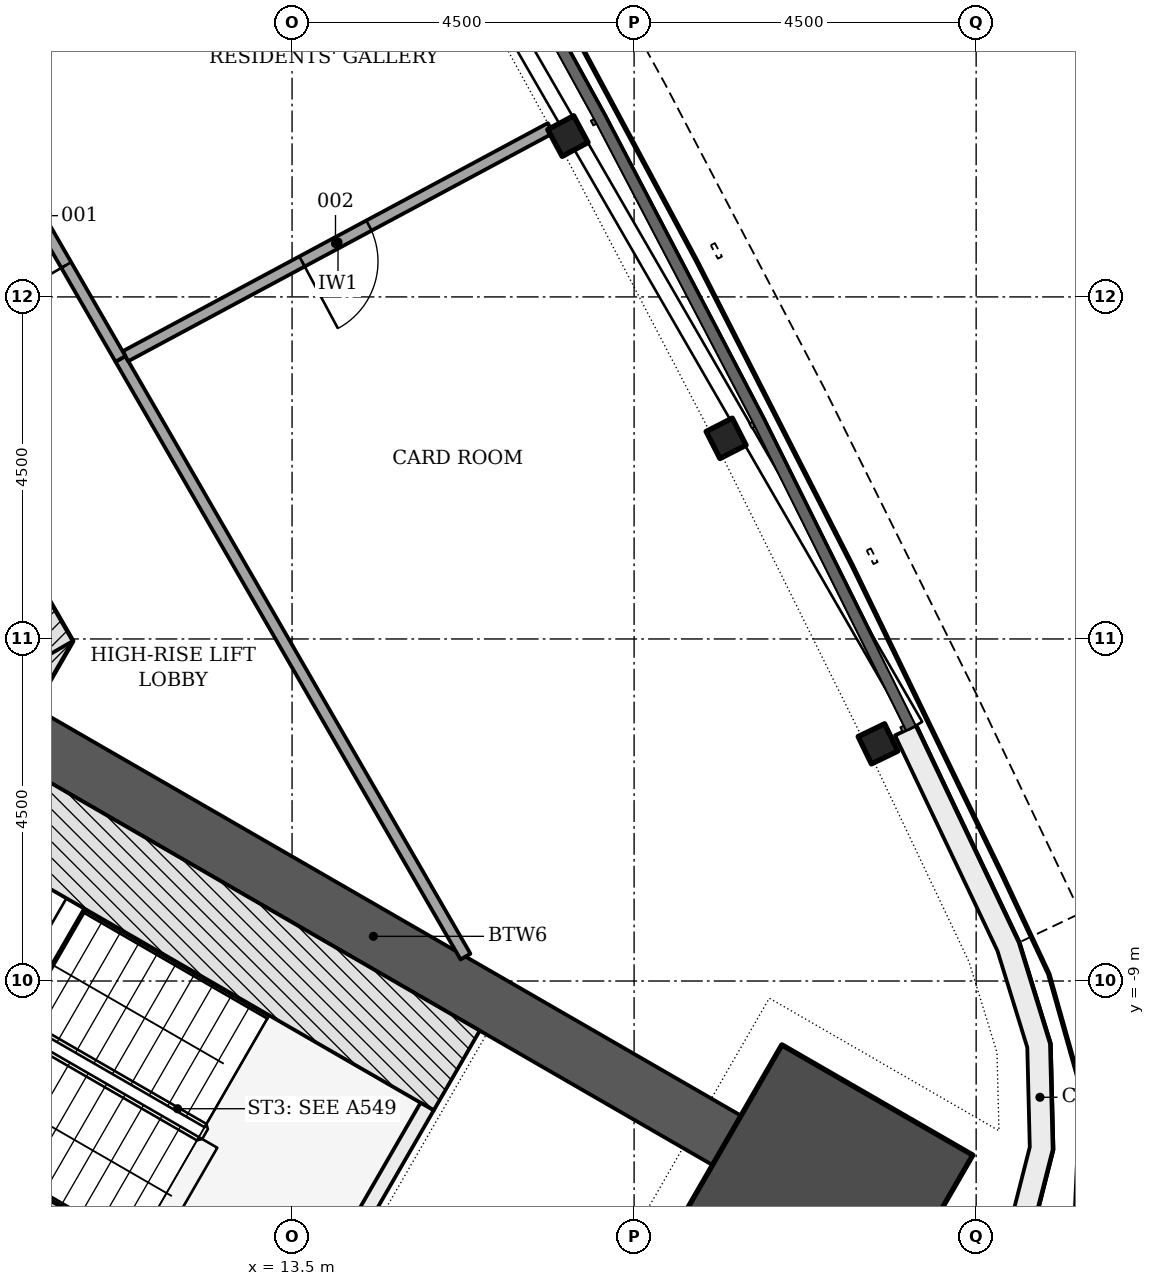
"""IFC4 building model, lengths in metres.
Left out: names, types, materials, properties, quantities, classifications, styles, units other than length and angle.
Written with IfcOpenShell. Run it as: python <this file> out.ifc"""

import sys

from ifc_helpers import new_model, si_unit, direction, frame, frame_2d, origin, origin_2d, place, context, subcontext, project, spatial, polyline, rectangle, i_section, outline, extrude, element, fill, save


model = new_model("IFC4")
c1 = context("Model", 3, precision=1e-05, world=origin(), true_north=direction((0.0, 1.0)))
c2 = subcontext(c1, "Body", "Model", "MODEL_VIEW")
j1 = project(units=[si_unit("LENGTHUNIT", "METRE"), si_unit("PLANEANGLEUNIT", "RADIAN")], contexts=[c1])
p1 = place(None, origin())
s1 = spatial("IfcSite", under=j1, at=p1, CompositionType="ELEMENT")
p2 = place(p1, origin())
s2 = spatial("IfcBuilding", under=s1, at=p2, CompositionType="ELEMENT")
p3 = place(p2, frame((0.0, 0.0, 150.9)))
s3 = spatial("IfcBuildingStorey", under=s2, at=p3, CompositionType="ELEMENT", Elevation=150.9)
p4 = place(p3, frame((8.926, -6.753, -0.2), z_axis=(0.0, 0.0, 1.0), x_axis=(0.500042739161, 0.866000726912, 0.0)))
e1 = element("IfcWall", 1, at=p4, inside=s3, PredefinedType="SHEAR", context=c2, shape_type="SweptSolid", body=[
    extrude(rectangle(XDim=2.771, YDim=0.7, at=frame_2d((1.386, 0.0))), origin(), (0.0, 0.0, 1.0), 3.6),
])
p5 = place(p3, frame((10.311, -4.703, -0.2), z_axis=(0.0, 0.0, 1.0), x_axis=(-0.500001446645, 0.866024568562, 0.0)))
e2 = element("IfcWall", 2, at=p5, inside=s3, PredefinedType="SHEAR", context=c2, shape_type="SweptSolid", body=[
    extrude(rectangle(XDim=18.458, YDim=0.7, at=frame_2d((9.229, 0.0))), origin(), (0.0, 0.0, 1.0), 3.6),
])
p6 = place(p5, frame((4.379, 0.0, 0.2)))
e3 = element("IfcOpeningElement", 3, at=p6, cuts=e2, PredefinedType="OPENING", context=c2, shape_type="SweptSolid", body=[
    extrude(rectangle(XDim=1.1, YDim=2.1, at=frame_2d((0.55, 1.05))), frame((0.0, 0.36, 0.0), z_axis=(0.0, -1.0, 0.0), x_axis=(1.0, 0.0, 0.0)), (0.0, 0.0, 1.0), 0.72),
])
p7 = place(p5, frame((6.529, 0.0, 0.2)))
e4 = element("IfcOpeningElement", 4, at=p7, cuts=e2, PredefinedType="OPENING", context=c2, shape_type="SweptSolid", body=[
    extrude(rectangle(XDim=1.1, YDim=2.1, at=frame_2d((0.55, 1.05))), frame((0.0, 0.36, 0.0), z_axis=(0.0, -1.0, 0.0), x_axis=(1.0, 0.0, 0.0)), (0.0, 0.0, 1.0), 0.72),
])
p8 = place(p5, frame((8.679, 0.0, 0.2)))
e5 = element("IfcOpeningElement", 5, at=p8, cuts=e2, PredefinedType="OPENING", context=c2, shape_type="SweptSolid", body=[
    extrude(rectangle(XDim=1.1, YDim=2.1, at=frame_2d((0.55, 1.05))), frame((0.0, 0.36, 0.0), z_axis=(0.0, -1.0, 0.0), x_axis=(1.0, 0.0, 0.0)), (0.0, 0.0, 1.0), 0.72),
])
p9 = place(p5, frame((10.829, 0.0, 0.2)))
e6 = element("IfcOpeningElement", 6, at=p9, cuts=e2, PredefinedType="OPENING", context=c2, shape_type="SweptSolid", body=[
    extrude(rectangle(XDim=1.1, YDim=2.1, at=frame_2d((0.55, 1.05))), frame((0.0, 0.36, 0.0), z_axis=(0.0, -1.0, 0.0), x_axis=(1.0, 0.0, 0.0)), (0.0, 0.0, 1.0), 0.72),
])
p10 = place(p5, frame((12.979, 0.0, 0.2)))
e7 = element("IfcOpeningElement", 7, at=p10, cuts=e2, PredefinedType="OPENING", context=c2, shape_type="SweptSolid", body=[
    extrude(rectangle(XDim=1.1, YDim=2.1, at=frame_2d((0.55, 1.05))), frame((0.0, 0.36, 0.0), z_axis=(0.0, -1.0, 0.0), x_axis=(1.0, 0.0, 0.0)), (0.0, 0.0, 1.0), 0.72),
])
p11 = place(p3, frame((9.922, -5.728, -0.2), z_axis=(0.0, 0.0, 1.0), x_axis=(0.86602614826, -0.499998710529, 0.0)))
e8 = element("IfcWall", 8, at=p11, inside=s3, PredefinedType="SHEAR", context=c2, shape_type="SweptSolid", body=[
    extrude(rectangle(XDim=10.735, YDim=0.75, at=frame_2d((5.368, 0.0))), origin(), (0.0, 0.0, 1.0), 3.6),
])
p12 = place(p3, frame((20.475, -11.821, -0.2), z_axis=(0.0, 0.0, 1.0), x_axis=(0.866025403784, -0.5, 0.0)))
e9 = element("IfcColumn", 9, at=p12, inside=s3, PredefinedType="COLUMN", context=c2, shape_type="SweptSolid", body=[
    extrude(rectangle(XDim=2.9, YDim=2.9, at=origin_2d()), origin(), (0.0, 0.0, 1.0), 3.6),
])
for number, where, z_axis, x_axis in (
    (10, (21.209, -5.88, -0.2), (0.0, 0.0, 1.0), (-0.436, 0.9, 0.0)),
    (11, (19.21, -1.861, -0.2), (0.0, 0.0, 1.0), (-0.454, 0.891, 0.0)),
    (12, (17.129, 2.116, -0.2), (0.0, 0.0, 1.0), (-0.473, 0.881, 0.0)),
):
    element("IfcColumn", number, at=place(p3, frame(where, z_axis=z_axis, x_axis=x_axis)), inside=s3, PredefinedType="COLUMN", context=c2, shape_type="SweptSolid", body=[
        extrude(i_section(OverallWidth=0.399, OverallDepth=0.386, WebThickness=0.021, FlangeThickness=0.033, FilletRadius=0.015, at=origin_2d()), origin(), (0.0, 0.0, 1.0), 3.6),
    ])
p13 = place(p3, origin())
e13 = element("IfcWall", 13, at=p13, inside=s3, PredefinedType="NOTDEFINED", context=c2, shape_type="SweptSolid", body=[
    extrude(outline(polyline([(15.736, -15.976), (18.887, -15.724), (20.245, -15.414), (21.469, -14.748), (22.466, -13.775), (23.163, -12.569), (23.507, -11.219), (23.472, -9.826), (23.061, -8.494), (21.704, -5.64), (21.433, -5.769), (22.781, -8.604), (23.173, -9.875), (23.206, -11.185), (22.882, -12.455), (22.227, -13.589), (21.289, -14.504), (20.138, -15.131), (18.841, -15.427), (15.712, -15.677), (15.736, -15.976)])), origin(), (0.0, 0.0, 1.0), 3.3),
])
p14 = place(p3, frame((7.304, -10.262, -0.2), z_axis=(0.0, 0.0, 1.0), x_axis=(0.866026594901, -0.49999793692, 0.0)))
e14 = element("IfcWall", 14, at=p14, inside=s3, PredefinedType="SHEAR", context=c2, shape_type="SweptSolid", body=[
    extrude(rectangle(XDim=5.6, YDim=0.2, at=frame_2d((2.8, 0.0))), origin(), (0.0, 0.0, 1.0), 3.6),
])
p15 = place(p14, frame((0.45, 0.0, 0.2)))
e15 = element("IfcOpeningElement", 15, at=p15, cuts=e14, PredefinedType="OPENING", context=c2, shape_type="SweptSolid", body=[
    extrude(rectangle(XDim=1.2, YDim=2.1, at=frame_2d((0.6, 1.05))), frame((0.0, 0.11, 0.0), z_axis=(0.0, -1.0, 0.0), x_axis=(1.0, 0.0, 0.0)), (0.0, 0.0, 1.0), 0.22),
])
p16 = place(p3, frame((9.431, -6.577, -0.2), z_axis=(0.0, 0.0, 1.0), x_axis=(0.866018442252, -0.500012057535, 0.0)))
e16 = element("IfcWall", 16, at=p16, inside=s3, PredefinedType="SHEAR", context=c2, shape_type="SweptSolid", body=[
    extrude(rectangle(XDim=7.2, YDim=1.211, at=frame_2d((3.6, 0.0))), origin(), (0.0, 0.0, 1.0), 3.6),
])
p17 = place(p3, frame((0.0, 0.0, -0.2)))
e17 = element("IfcWall", 17, at=p17, inside=s3, PredefinedType="SHEAR", context=c2, shape_type="SweptSolid", body=[
    extrude(outline(polyline([(12.104, -13.149), (14.289, -12.563), (15.364, -10.701), (15.191, -10.601), (14.157, -12.392), (12.132, -12.934), (12.204, -12.976), (12.204, -12.976), (12.204, -12.976), (12.204, -12.976), (12.204, -12.976), (12.204, -12.976), (12.204, -12.976), (12.204, -12.976), (12.204, -12.976), (12.204, -12.976), (12.204, -12.976), (12.204, -12.976), (12.204, -12.976), (12.204, -12.976), (12.204, -12.976), (12.204, -12.976), (12.204, -12.976), (12.104, -13.149)])), origin(), (0.0, 0.0, 1.0), 3.6),
])
p18 = place(p3, frame((15.782, -8.679, 0.0), z_axis=(0.0, 0.0, 1.0), x_axis=(-0.500005644317, 0.866022145012, 0.0)))
e18 = element("IfcWall", 18, at=p18, inside=s3, PredefinedType="PARTITIONING", context=c2, shape_type="SweptSolid", body=[
    extrude(rectangle(XDim=9.08, YDim=0.15, at=frame_2d((4.54, 0.0))), origin(), (0.0, 0.0, 1.0), 2.847),
])
p19 = place(p3, frame((16.901, 2.221, 0.0), z_axis=(0.0, 0.0, 1.0), x_axis=(-0.881144631688, -0.472846844177, 0.0)))
e19 = element("IfcWall", 19, at=p19, inside=s3, PredefinedType="PARTITIONING", context=c2, shape_type="SweptSolid", body=[
    extrude(rectangle(XDim=6.347, YDim=0.15, at=frame_2d((3.173, 0.0))), origin(), (0.0, 0.0, 1.0), 3.4),
])
p20 = place(p19, frame((2.711, 0.0, 0.0)))
e20 = element("IfcOpeningElement", 20, at=p20, cuts=e19, PredefinedType="OPENING", context=c2, shape_type="SweptSolid", body=[
    extrude(rectangle(XDim=1.0, YDim=2.1, at=frame_2d((0.5, 1.05))), frame((0.0, 0.085, 0.0), z_axis=(0.0, -1.0, 0.0), x_axis=(1.0, 0.0, 0.0)), (0.0, 0.0, 1.0), 0.17),
])
p21 = place(p3, frame((14.735, 6.149, 0.0), z_axis=(0.0, 0.0, 1.0), x_axis=(-0.871163720424, -0.490992639676, 0.0)))
e21 = element("IfcWall", 21, at=p21, inside=s3, PredefinedType="PARTITIONING", context=c2, shape_type="SweptSolid", body=[
    extrude(rectangle(XDim=6.433, YDim=0.15, at=frame_2d((3.216, 0.0))), origin(), (0.0, 0.0, 1.0), 3.4),
])
p22 = place(p21, frame((2.754, 0.0, 0.0)))
e22 = element("IfcOpeningElement", 22, at=p22, cuts=e21, PredefinedType="OPENING", context=c2, shape_type="SweptSolid", body=[
    extrude(rectangle(XDim=1.0, YDim=2.1, at=frame_2d((0.5, 1.05))), frame((0.0, 0.085, 0.0), z_axis=(0.0, -1.0, 0.0), x_axis=(1.0, 0.0, 0.0)), (0.0, 0.0, 1.0), 0.17),
])
p23 = place(p3, frame((11.242, -0.816, 0.0), z_axis=(0.0, 0.0, 1.0), x_axis=(-0.499994385119, 0.866028645513, 0.0)))
e23 = element("IfcWall", 23, at=p23, inside=s3, PredefinedType="PARTITIONING", context=c2, shape_type="SweptSolid", body=[
    extrude(rectangle(XDim=4.352, YDim=0.15, at=frame_2d((2.176, 0.0))), origin(), (0.0, 0.0, 1.0), 2.847),
])
p24 = place(p23, frame((1.426, 0.0, 0.0)))
e24 = element("IfcOpeningElement", 24, at=p24, cuts=e23, PredefinedType="OPENING", context=c2, shape_type="SweptSolid", body=[
    extrude(rectangle(XDim=1.5, YDim=2.1, at=frame_2d((0.75, 1.05))), frame((0.0, 0.085, 0.0), z_axis=(0.0, -1.0, 0.0), x_axis=(1.0, 0.0, 0.0)), (0.0, 0.0, 1.0), 0.17),
])
p25 = place(p24, origin())
e25 = element("IfcDoor", 25, at=p25, inside=s3, OperationType="DOUBLE_DOOR_SINGLE_SWING", PredefinedType="DOOR", context=c2, shape_type="SweptSolid", body=[
    extrude(rectangle(XDim=1.5, YDim=2.1, at=frame_2d((0.75, 1.05))), frame((0.0, 0.025, 0.0), z_axis=(0.0, -1.0, 0.0), x_axis=(1.0, 0.0, 0.0)), (0.0, 0.0, 1.0), 0.05),
])
fill(e24, e25)
p26 = place(p20, origin())
e26 = element("IfcDoor", 26, at=p26, inside=s3, OperationType="SINGLE_SWING_RIGHT", PredefinedType="DOOR", context=c2, shape_type="SweptSolid", body=[
    extrude(rectangle(XDim=1.0, YDim=2.1, at=frame_2d((0.5, 1.05))), frame((0.0, 0.025, 0.0), z_axis=(0.0, -1.0, 0.0), x_axis=(1.0, 0.0, 0.0)), (0.0, 0.0, 1.0), 0.05),
])
fill(e20, e26)
save(model, sys.argv[1])
